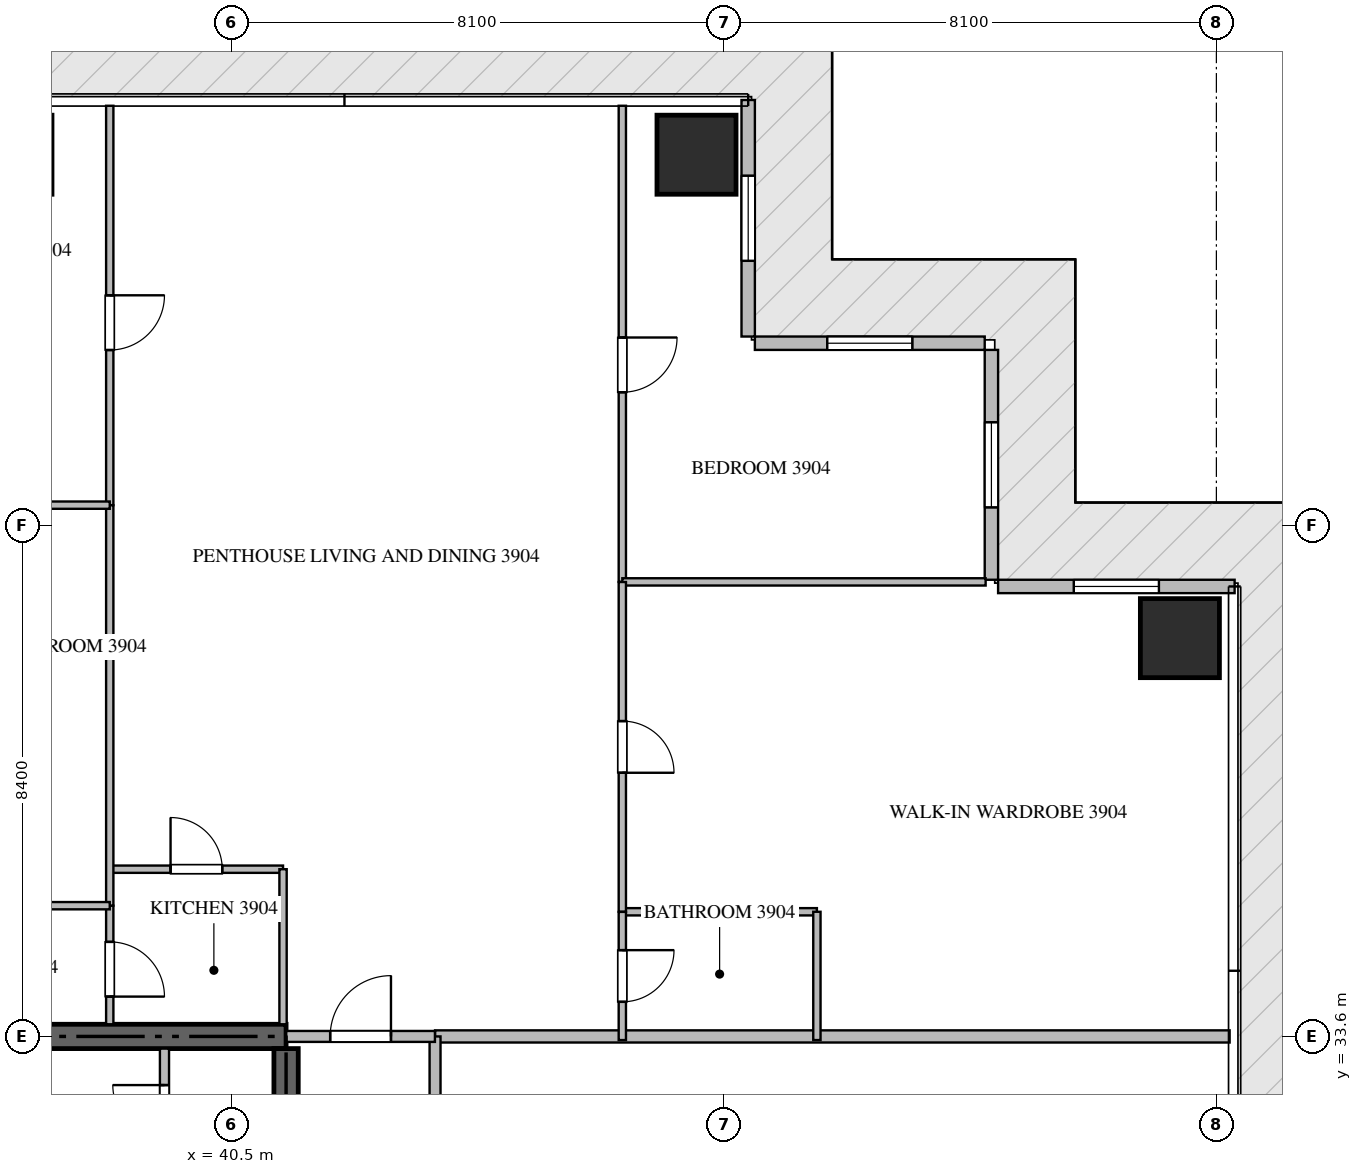
"""IFC4 building model, lengths in metres.
Left out: names, types, materials, properties, quantities, classifications, styles, units other than length and angle.
Written with IfcOpenShell. Run it as: python <this file> out.ifc"""

import sys

from ifc_helpers import new_model, si_unit, direction, frame, frame_2d, origin, origin_2d, place, context, subcontext, project, spatial, rectangle, extrude, source, transform, mapped, element, fill, save


model = new_model("IFC4")
c1 = context("Model", 3, precision=1e-05, world=origin(), true_north=direction((0.0, 1.0)))
c2 = subcontext(c1, "Body", "Model", "MODEL_VIEW")
j1 = project(units=[si_unit("LENGTHUNIT", "METRE"), si_unit("PLANEANGLEUNIT", "RADIAN")], contexts=[c1])
p1 = place(None, origin())
s1 = spatial("IfcSite", under=j1, at=p1, CompositionType="ELEMENT")
p2 = place(p1, origin())
s2 = spatial("IfcBuilding", under=s1, at=p2, CompositionType="ELEMENT")
p3 = place(p2, frame((0.0, 0.0, 157.65)))
s3 = spatial("IfcBuildingStorey", under=s2, at=p3, CompositionType="ELEMENT", Elevation=157.65)
p4 = place(p3, frame((41.4, 33.6, -0.26), z_axis=(0.0, 0.0, 1.0), x_axis=(-1.0, 0.0, 0.0)))
e1 = element("IfcWall", 1, at=p4, inside=s3, PredefinedType="SHEAR", context=c2, shape_type="SweptSolid", body=[
    extrude(rectangle(XDim=18.0, YDim=0.4, at=frame_2d((9.0, 0.0))), origin(), (0.0, 0.0, 1.0), 3.748),
])
p5 = place(p3, frame((41.4, 27.75, -0.26), z_axis=(0.0, 0.0, 1.0), x_axis=(0.0, 1.0, 0.0)))
e2 = element("IfcWall", 2, at=p5, inside=s3, PredefinedType="SHEAR", context=c2, shape_type="SweptSolid", body=[
    extrude(rectangle(XDim=5.65, YDim=0.4, at=frame_2d((2.825, 0.0))), origin(), (0.0, 0.0, 1.0), 3.748),
])
m1 = source(origin(), c2, "Body", "SweptSolid", [
    extrude(rectangle(XDim=1.3, YDim=1.3, at=origin_2d()), origin(), (0.0, 0.0, 1.0), 3.75),
])
for number, where, z_axis, x_axis in (
    (3, (48.15, 48.1, -0.26), (0.0, 0.0, 1.0), (1.0, 0.0, 0.0)),
    (4, (56.1, 40.15, -0.26), (0.0, 0.0, 1.0), (1.0, 0.0, 0.0)),
):
    element("IfcColumn", number, at=place(p3, frame(where, z_axis=z_axis, x_axis=x_axis)), inside=s3, PredefinedType="COLUMN", context=c2, shape_type="MappedRepresentation", body=[
        mapped(m1, transform((0.0, 0.0, 0.0), scale=1.0)),
    ])
p6 = place(p3, frame((57.0, 41.0, 0.0), z_axis=(0.0, 0.0, 1.0), x_axis=(-1.0, 0.0, 0.0)))
e5 = element("IfcWall", 5, at=p6, inside=s3, PredefinedType="ELEMENTEDWALL", context=c2, shape_type="SweptSolid", body=[
    extrude(rectangle(XDim=3.89, YDim=0.22, at=frame_2d((1.945, 0.0))), origin(), (0.0, 0.0, 1.0), 3.475),
])
p7 = place(p6, frame((1.245, 0.0, 0.65)))
e6 = element("IfcOpeningElement", 6, at=p7, cuts=e5, PredefinedType="OPENING", context=c2, shape_type="SweptSolid", body=[
    extrude(rectangle(XDim=1.4, YDim=2.05, at=frame_2d((0.7, 1.025))), frame((0.0, 0.12, 0.0), z_axis=(0.0, -1.0, 0.0), x_axis=(1.0, 0.0, 0.0)), (0.0, 0.0, 1.0), 0.24),
])
p8 = place(p3, frame((53.0, 41.11, 0.0), z_axis=(0.0, 0.0, 1.0), x_axis=(0.0, 1.0, 0.0)))
e7 = element("IfcWall", 7, at=p8, inside=s3, PredefinedType="ELEMENTEDWALL", context=c2, shape_type="SweptSolid", body=[
    extrude(rectangle(XDim=3.78, YDim=0.22, at=frame_2d((1.89, 0.0))), origin(), (0.0, 0.0, 1.0), 3.475),
])
p9 = place(p8, frame((1.19, 0.0, 0.65)))
e8 = element("IfcOpeningElement", 8, at=p9, cuts=e7, PredefinedType="OPENING", context=c2, shape_type="SweptSolid", body=[
    extrude(rectangle(XDim=1.4, YDim=2.05, at=frame_2d((0.7, 1.025))), frame((0.0, 0.12, 0.0), z_axis=(0.0, -1.0, 0.0), x_axis=(1.0, 0.0, 0.0)), (0.0, 0.0, 1.0), 0.24),
])
p10 = place(p3, frame((52.89, 45.0, 0.0), z_axis=(0.0, 0.0, 1.0), x_axis=(-1.0, 0.0, 0.0)))
e9 = element("IfcWall", 9, at=p10, inside=s3, PredefinedType="ELEMENTEDWALL", context=c2, shape_type="SweptSolid", body=[
    extrude(rectangle(XDim=3.78, YDim=0.22, at=frame_2d((1.89, 0.0))), origin(), (0.0, 0.0, 1.0), 3.475),
])
p11 = place(p10, frame((1.19, 0.0, 0.65)))
e10 = element("IfcOpeningElement", 10, at=p11, cuts=e9, PredefinedType="OPENING", context=c2, shape_type="SweptSolid", body=[
    extrude(rectangle(XDim=1.4, YDim=2.05, at=frame_2d((0.7, 1.025))), frame((0.0, 0.12, 0.0), z_axis=(0.0, -1.0, 0.0), x_axis=(1.0, 0.0, 0.0)), (0.0, 0.0, 1.0), 0.24),
])
p12 = place(p3, frame((49.0, 45.11, 0.0), z_axis=(0.0, 0.0, 1.0), x_axis=(0.0, 1.0, 0.0)))
e11 = element("IfcWall", 11, at=p12, inside=s3, PredefinedType="ELEMENTEDWALL", context=c2, shape_type="SweptSolid", body=[
    extrude(rectangle(XDim=3.89, YDim=0.22, at=frame_2d((1.945, 0.0))), origin(), (0.0, 0.0, 1.0), 3.475),
])
p13 = place(p12, frame((1.245, 0.0, 0.65)))
e12 = element("IfcOpeningElement", 12, at=p13, cuts=e11, PredefinedType="OPENING", context=c2, shape_type="SweptSolid", body=[
    extrude(rectangle(XDim=1.4, YDim=2.05, at=frame_2d((0.7, 1.025))), frame((0.0, 0.12, 0.0), z_axis=(0.0, -1.0, 0.0), x_axis=(1.0, 0.0, 0.0)), (0.0, 0.0, 1.0), 0.24),
])
p14 = place(p3, frame((39.4, 31.35, 0.0), z_axis=(0.0, 0.0, 1.0), x_axis=(0.0, 1.0, 0.0)))
e13 = element("IfcWall", 13, at=p14, inside=s3, PredefinedType="PARTITIONING", context=c2, shape_type="SweptSolid", body=[
    extrude(rectangle(XDim=2.05, YDim=0.15, at=frame_2d((1.025, 0.0))), origin(), (0.0, 0.0, 1.0), 3.49),
])
p15 = place(p14, frame((0.6, 0.0, 0.0)))
e14 = element("IfcOpeningElement", 14, at=p15, cuts=e13, PredefinedType="OPENING", context=c2, shape_type="SweptSolid", body=[
    extrude(rectangle(XDim=0.85, YDim=2.1, at=frame_2d((0.425, 1.05))), frame((0.0, 0.085, 0.0), z_axis=(0.0, -1.0, 0.0), x_axis=(1.0, 0.0, 0.0)), (0.0, 0.0, 1.0), 0.17),
])
p16 = place(p3, frame((43.85, 33.6, 0.0), z_axis=(0.0, 0.0, 1.0), x_axis=(1.0, 0.0, 0.0)))
e15 = element("IfcWall", 15, at=p16, inside=s3, PredefinedType="PARTITIONING", context=c2, shape_type="SweptSolid", body=[
    extrude(rectangle(XDim=13.068, YDim=0.2, at=frame_2d((6.534, 0.0))), origin(), (0.0, 0.0, 1.0), 3.49),
])
p17 = place(p3, frame((43.85, 14.9, 0.0), z_axis=(0.0, 0.0, 1.0), x_axis=(0.0, 1.0, 0.0)))
e16 = element("IfcWall", 16, at=p17, inside=s3, PredefinedType="PARTITIONING", context=c2, shape_type="SweptSolid", body=[
    extrude(rectangle(XDim=18.7, YDim=0.18, at=frame_2d((9.35, 0.0))), origin(), (0.0, 0.0, 1.0), 3.49),
])
p18 = place(p17, frame((1.805, 0.0, 0.0)))
e17 = element("IfcOpeningElement", 17, at=p18, cuts=e16, PredefinedType="OPENING", context=c2, shape_type="SweptSolid", body=[
    extrude(rectangle(XDim=1.0, YDim=2.15, at=frame_2d((0.5, 1.075))), frame((0.0, 0.1, 0.0), z_axis=(0.0, -1.0, 0.0), x_axis=(1.0, 0.0, 0.0)), (0.0, 0.0, 1.0), 0.2),
])
p19 = place(p17, frame((14.833, 0.0, 0.0)))
e18 = element("IfcOpeningElement", 18, at=p19, cuts=e16, PredefinedType="OPENING", context=c2, shape_type="SweptSolid", body=[
    extrude(rectangle(XDim=1.0, YDim=2.15, at=frame_2d((0.5, 1.075))), frame((0.0, 0.1, 0.0), z_axis=(0.0, -1.0, 0.0), x_axis=(1.0, 0.0, 0.0)), (0.0, 0.0, 1.0), 0.2),
])
p20 = place(p3, frame((41.402, 33.6, 0.0), z_axis=(0.0, 0.0, 1.0), x_axis=(1.0, 0.0, 0.0)))
e19 = element("IfcWall", 19, at=p20, inside=s3, PredefinedType="PARTITIONING", context=c2, shape_type="SweptSolid", body=[
    extrude(rectangle(XDim=2.446, YDim=0.18, at=frame_2d((1.223, 0.0))), origin(), (0.0, 0.0, 1.0), 3.49),
])
p21 = place(p20, frame((0.723, 0.0, 0.0)))
e20 = element("IfcOpeningElement", 20, at=p21, cuts=e19, PredefinedType="OPENING", context=c2, shape_type="SweptSolid", body=[
    extrude(rectangle(XDim=1.0, YDim=2.15, at=frame_2d((0.5, 1.075))), frame((0.0, 0.1, 0.0), z_axis=(0.0, -1.0, 0.0), x_axis=(1.0, 0.0, 0.0)), (0.0, 0.0, 1.0), 0.2),
])
p22 = place(p3, frame((38.5, 36.35, 0.0), z_axis=(0.0, 0.0, 1.0), x_axis=(1.0, 0.0, 0.0)))
e21 = element("IfcWall", 21, at=p22, inside=s3, PredefinedType="PARTITIONING", context=c2, shape_type="SweptSolid", body=[
    extrude(rectangle(XDim=2.85, YDim=0.12, at=frame_2d((1.425, 0.0))), origin(), (0.0, 0.0, 1.0), 3.49),
])
p23 = place(p22, frame((1.0, 0.0, 0.0)))
e22 = element("IfcOpeningElement", 22, at=p23, cuts=e21, PredefinedType="OPENING", context=c2, shape_type="SweptSolid", body=[
    extrude(rectangle(XDim=0.85, YDim=2.1, at=frame_2d((0.425, 1.05))), frame((0.0, 0.07, 0.0), z_axis=(0.0, -1.0, 0.0), x_axis=(1.0, 0.0, 0.0)), (0.0, 0.0, 1.0), 0.14),
])
p24 = place(p3, frame((41.35, 36.35, 0.0), z_axis=(0.0, 0.0, 1.0), x_axis=(0.0, -1.0, 0.0)))
e23 = element("IfcWall", 23, at=p24, inside=s3, PredefinedType="PARTITIONING", context=c2, shape_type="SweptSolid", body=[
    extrude(rectangle(XDim=2.55, YDim=0.12, at=frame_2d((1.275, 0.0))), origin(), (0.0, 0.0, 1.0), 3.49),
])
p25 = place(p3, frame((38.5, 35.75, 0.0), z_axis=(0.0, 0.0, 1.0), x_axis=(0.0, -1.0, 0.0)))
e24 = element("IfcWall", 24, at=p25, inside=s3, PredefinedType="PARTITIONING", context=c2, shape_type="SweptSolid", body=[
    extrude(rectangle(XDim=1.95, YDim=0.12, at=frame_2d((0.975, 0.0))), origin(), (0.0, 0.0, 1.0), 3.49),
])
p26 = place(p25, frame((0.595, 0.0, 0.0)))
e25 = element("IfcOpeningElement", 25, at=p26, cuts=e24, PredefinedType="OPENING", context=c2, shape_type="SweptSolid", body=[
    extrude(rectangle(XDim=0.9, YDim=2.1, at=frame_2d((0.45, 1.05))), frame((0.0, 0.07, 0.0), z_axis=(0.0, -1.0, 0.0), x_axis=(1.0, 0.0, 0.0)), (0.0, 0.0, 1.0), 0.14),
])
p27 = place(p3, frame((38.5, 48.905, 0.0), z_axis=(0.0, 0.0, 1.0), x_axis=(0.0, -1.0, 0.0)))
e26 = element("IfcWall", 26, at=p27, inside=s3, PredefinedType="PARTITIONING", context=c2, shape_type="SweptSolid", body=[
    extrude(rectangle(XDim=6.568, YDim=0.12, at=frame_2d((3.284, 0.0))), origin(), (0.0, 0.0, 1.0), 3.49),
])
p28 = place(p27, frame((3.117, 0.0, 0.0)))
e27 = element("IfcOpeningElement", 27, at=p28, cuts=e26, PredefinedType="OPENING", context=c2, shape_type="SweptSolid", body=[
    extrude(rectangle(XDim=0.9, YDim=2.1, at=frame_2d((0.45, 1.05))), frame((0.0, 0.07, 0.0), z_axis=(0.0, -1.0, 0.0), x_axis=(1.0, 0.0, 0.0)), (0.0, 0.0, 1.0), 0.14),
])
p29 = place(p3, frame((38.5, 42.335, 0.0), z_axis=(0.0, 0.0, 1.0), x_axis=(0.0, -1.0, 0.0)))
e28 = element("IfcWall", 28, at=p29, inside=s3, PredefinedType="PARTITIONING", context=c2, shape_type="SweptSolid", body=[
    extrude(rectangle(XDim=6.583, YDim=0.12, at=frame_2d((3.292, 0.0))), origin(), (0.0, 0.0, 1.0), 3.49),
])
p30 = place(p3, frame((33.35, 42.337, 0.0), z_axis=(0.0, 0.0, 1.0), x_axis=(1.0, 0.0, 0.0)))
e29 = element("IfcWall", 29, at=p30, inside=s3, PredefinedType="PARTITIONING", context=c2, shape_type="SweptSolid", body=[
    extrude(rectangle(XDim=5.15, YDim=0.12, at=frame_2d((2.575, 0.0))), origin(), (0.0, 0.0, 1.0), 3.49),
])
p31 = place(p3, frame((35.452, 35.75, 0.0), z_axis=(0.0, 0.0, 1.0), x_axis=(1.0, 0.0, 0.0)))
e30 = element("IfcWall", 30, at=p31, inside=s3, PredefinedType="PARTITIONING", context=c2, shape_type="SweptSolid", body=[
    extrude(rectangle(XDim=3.048, YDim=0.12, at=frame_2d((1.524, 0.0))), origin(), (0.0, 0.0, 1.0), 3.49),
])
p32 = place(p31, frame((1.099, 0.0, 0.0)))
e31 = element("IfcOpeningElement", 31, at=p32, cuts=e30, PredefinedType="OPENING", context=c2, shape_type="SweptSolid", body=[
    extrude(rectangle(XDim=0.85, YDim=2.1, at=frame_2d((0.425, 1.05))), frame((0.0, 0.07, 0.0), z_axis=(0.0, -1.0, 0.0), x_axis=(1.0, 0.0, 0.0)), (0.0, 0.0, 1.0), 0.14),
])
p33 = place(p3, frame((46.93, 48.905, 0.0), z_axis=(0.0, 0.0, 1.0), x_axis=(0.0, -1.0, 0.0)))
e32 = element("IfcWall", 32, at=p33, inside=s3, PredefinedType="PARTITIONING", context=c2, shape_type="SweptSolid", body=[
    extrude(rectangle(XDim=7.83, YDim=0.12, at=frame_2d((3.915, 0.0))), origin(), (0.0, 0.0, 1.0), 3.49),
])
p34 = place(p33, frame((3.811, 0.0, 0.0)))
e33 = element("IfcOpeningElement", 33, at=p34, cuts=e32, PredefinedType="OPENING", context=c2, shape_type="SweptSolid", body=[
    extrude(rectangle(XDim=0.9, YDim=2.1, at=frame_2d((0.45, 1.05))), frame((0.0, 0.07, 0.0), z_axis=(0.0, -1.0, 0.0), x_axis=(1.0, 0.0, 0.0)), (0.0, 0.0, 1.0), 0.14),
])
p35 = place(p3, frame((46.93, 41.075, 0.0), z_axis=(0.0, 0.0, 1.0), x_axis=(1.0, 0.0, 0.0)))
e34 = element("IfcWall", 34, at=p35, inside=s3, PredefinedType="PARTITIONING", context=c2, shape_type="SweptSolid", body=[
    extrude(rectangle(XDim=5.975, YDim=0.12, at=frame_2d((2.988, 0.0))), origin(), (0.0, 0.0, 1.0), 3.49),
])
p36 = place(p3, frame((46.93, 35.65, 0.0), z_axis=(0.0, 0.0, 1.0), x_axis=(1.0, 0.0, 0.0)))
e35 = element("IfcWall", 35, at=p36, inside=s3, PredefinedType="PARTITIONING", context=c2, shape_type="SweptSolid", body=[
    extrude(rectangle(XDim=3.2, YDim=0.12, at=frame_2d((1.6, 0.0))), origin(), (0.0, 0.0, 1.0), 3.49),
])
p37 = place(p3, frame((50.13, 35.65, 0.0), z_axis=(0.0, 0.0, 1.0), x_axis=(0.0, -1.0, 0.0)))
e36 = element("IfcWall", 36, at=p37, inside=s3, PredefinedType="PARTITIONING", context=c2, shape_type="SweptSolid", body=[
    extrude(rectangle(XDim=2.11, YDim=0.12, at=frame_2d((1.055, 0.0))), origin(), (0.0, 0.0, 1.0), 3.49),
])
p38 = place(p3, frame((46.93, 41.073, 0.0), z_axis=(0.0, 0.0, 1.0), x_axis=(0.0, -1.0, 0.0)))
e37 = element("IfcWall", 37, at=p38, inside=s3, PredefinedType="PARTITIONING", context=c2, shape_type="SweptSolid", body=[
    extrude(rectangle(XDim=5.423, YDim=0.12, at=frame_2d((2.711, 0.0))), origin(), (0.0, 0.0, 1.0), 3.49),
])
p39 = place(p38, frame((2.287, 0.0, 0.0)))
e38 = element("IfcOpeningElement", 38, at=p39, cuts=e37, PredefinedType="OPENING", context=c2, shape_type="SweptSolid", body=[
    extrude(rectangle(XDim=0.85, YDim=2.1, at=frame_2d((0.425, 1.05))), frame((0.0, 0.07, 0.0), z_axis=(0.0, -1.0, 0.0), x_axis=(1.0, 0.0, 0.0)), (0.0, 0.0, 1.0), 0.14),
])
p40 = place(p3, frame((46.93, 35.648, 0.0), z_axis=(0.0, 0.0, 1.0), x_axis=(0.0, -1.0, 0.0)))
e39 = element("IfcWall", 39, at=p40, inside=s3, PredefinedType="PARTITIONING", context=c2, shape_type="SweptSolid", body=[
    extrude(rectangle(XDim=2.108, YDim=0.12, at=frame_2d((1.054, 0.0))), origin(), (0.0, 0.0, 1.0), 3.49),
])
p41 = place(p40, frame((0.629, 0.0, 0.0)))
e40 = element("IfcOpeningElement", 40, at=p41, cuts=e39, PredefinedType="OPENING", context=c2, shape_type="SweptSolid", body=[
    extrude(rectangle(XDim=0.85, YDim=2.1, at=frame_2d((0.425, 1.05))), frame((0.0, 0.07, 0.0), z_axis=(0.0, -1.0, 0.0), x_axis=(1.0, 0.0, 0.0)), (0.0, 0.0, 1.0), 0.14),
])
m2 = source(origin(), c2, "Body", "SweptSolid", [
    extrude(rectangle(XDim=1.4, YDim=2.05, at=frame_2d((0.7, 1.025))), frame((0.0, 0.03, 0.0), z_axis=(0.0, -1.0, 0.0), x_axis=(1.0, 0.0, 0.0)), (0.0, 0.0, 1.0), 0.06),
])
p42 = place(p7, origin())
e41 = element("IfcWindow", 41, at=p42, inside=s3, PartitioningType="SINGLE_PANEL", PredefinedType="WINDOW", context=c2, shape_type="MappedRepresentation", body=[
    mapped(m2, transform((0.0, 0.0, 0.0), scale=1.0)),
])
fill(e6, e41)
p43 = place(p9, origin())
e42 = element("IfcWindow", 42, at=p43, inside=s3, PartitioningType="SINGLE_PANEL", PredefinedType="WINDOW", context=c2, shape_type="MappedRepresentation", body=[
    mapped(m2, transform((0.0, 0.0, 0.0), scale=1.0)),
])
fill(e8, e42)
p44 = place(p11, origin())
e43 = element("IfcWindow", 43, at=p44, inside=s3, PartitioningType="SINGLE_PANEL", PredefinedType="WINDOW", context=c2, shape_type="MappedRepresentation", body=[
    mapped(m2, transform((0.0, 0.0, 0.0), scale=1.0)),
])
fill(e10, e43)
p45 = place(p13, origin())
e44 = element("IfcWindow", 44, at=p45, inside=s3, PartitioningType="SINGLE_PANEL", PredefinedType="WINDOW", context=c2, shape_type="MappedRepresentation", body=[
    mapped(m2, transform((0.0, 0.0, 0.0), scale=1.0)),
])
fill(e12, e44)
m3 = source(origin(), c2, "Body", "SweptSolid", [
    extrude(rectangle(XDim=0.85, YDim=2.1, at=frame_2d((0.425, 1.05))), frame((0.0, 0.025, 0.0), z_axis=(0.0, -1.0, 0.0), x_axis=(1.0, 0.0, 0.0)), (0.0, 0.0, 1.0), 0.05),
])
p46 = place(p15, origin())
e45 = element("IfcDoor", 45, at=p46, inside=s3, OperationType="SINGLE_SWING_RIGHT", PredefinedType="DOOR", context=c2, shape_type="MappedRepresentation", body=[
    mapped(m3, transform((0.0, 0.0, 0.0), scale=1.0)),
])
fill(e14, e45)
m4 = source(origin(), c2, "Body", "SweptSolid", [
    extrude(rectangle(XDim=1.0, YDim=2.15, at=frame_2d((0.5, 1.075))), frame((0.0, 0.025, 0.0), z_axis=(0.0, -1.0, 0.0), x_axis=(1.0, 0.0, 0.0)), (0.0, 0.0, 1.0), 0.05),
])
p47 = place(p21, origin())
e46 = element("IfcDoor", 46, at=p47, inside=s3, OperationType="SINGLE_SWING_RIGHT", PredefinedType="DOOR", context=c2, shape_type="MappedRepresentation", body=[
    mapped(m4, transform((0.0, 0.0, 0.0), scale=1.0)),
])
fill(e20, e46)
p48 = place(p23, origin())
e47 = element("IfcDoor", 47, at=p48, inside=s3, OperationType="SINGLE_SWING_LEFT", PredefinedType="DOOR", context=c2, shape_type="MappedRepresentation", body=[
    mapped(m3, transform((0.0, 0.0, 0.0), scale=1.0)),
])
fill(e22, e47)
m5 = source(origin(), c2, "Body", "SweptSolid", [
    extrude(rectangle(XDim=0.9, YDim=2.1, at=frame_2d((0.45, 1.05))), frame((0.0, 0.025, 0.0), z_axis=(0.0, -1.0, 0.0), x_axis=(1.0, 0.0, 0.0)), (0.0, 0.0, 1.0), 0.05),
])
p49 = place(p26, origin())
e48 = element("IfcDoor", 48, at=p49, inside=s3, OperationType="SINGLE_SWING_RIGHT", PredefinedType="DOOR", context=c2, shape_type="MappedRepresentation", body=[
    mapped(m5, transform((0.0, 0.0, 0.0), scale=1.0)),
])
fill(e25, e48)
p50 = place(p28, origin())
e49 = element("IfcDoor", 49, at=p50, inside=s3, OperationType="SINGLE_SWING_LEFT", PredefinedType="DOOR", context=c2, shape_type="MappedRepresentation", body=[
    mapped(m5, transform((0.0, 0.0, 0.0), scale=1.0)),
])
fill(e27, e49)
p51 = place(p34, origin())
e50 = element("IfcDoor", 50, at=p51, inside=s3, OperationType="SINGLE_SWING_LEFT", PredefinedType="DOOR", context=c2, shape_type="MappedRepresentation", body=[
    mapped(m5, transform((0.0, 0.0, 0.0), scale=1.0)),
])
fill(e33, e50)
p52 = place(p39, origin())
e51 = element("IfcDoor", 51, at=p52, inside=s3, OperationType="SINGLE_SWING_RIGHT", PredefinedType="DOOR", context=c2, shape_type="MappedRepresentation", body=[
    mapped(m3, transform((0.0, 0.0, 0.0), scale=1.0)),
])
fill(e38, e51)
p53 = place(p41, origin())
e52 = element("IfcDoor", 52, at=p53, inside=s3, OperationType="SINGLE_SWING_LEFT", PredefinedType="DOOR", context=c2, shape_type="MappedRepresentation", body=[
    mapped(m3, transform((0.0, 0.0, 0.0), scale=1.0)),
])
fill(e40, e52)
save(model, sys.argv[1])
